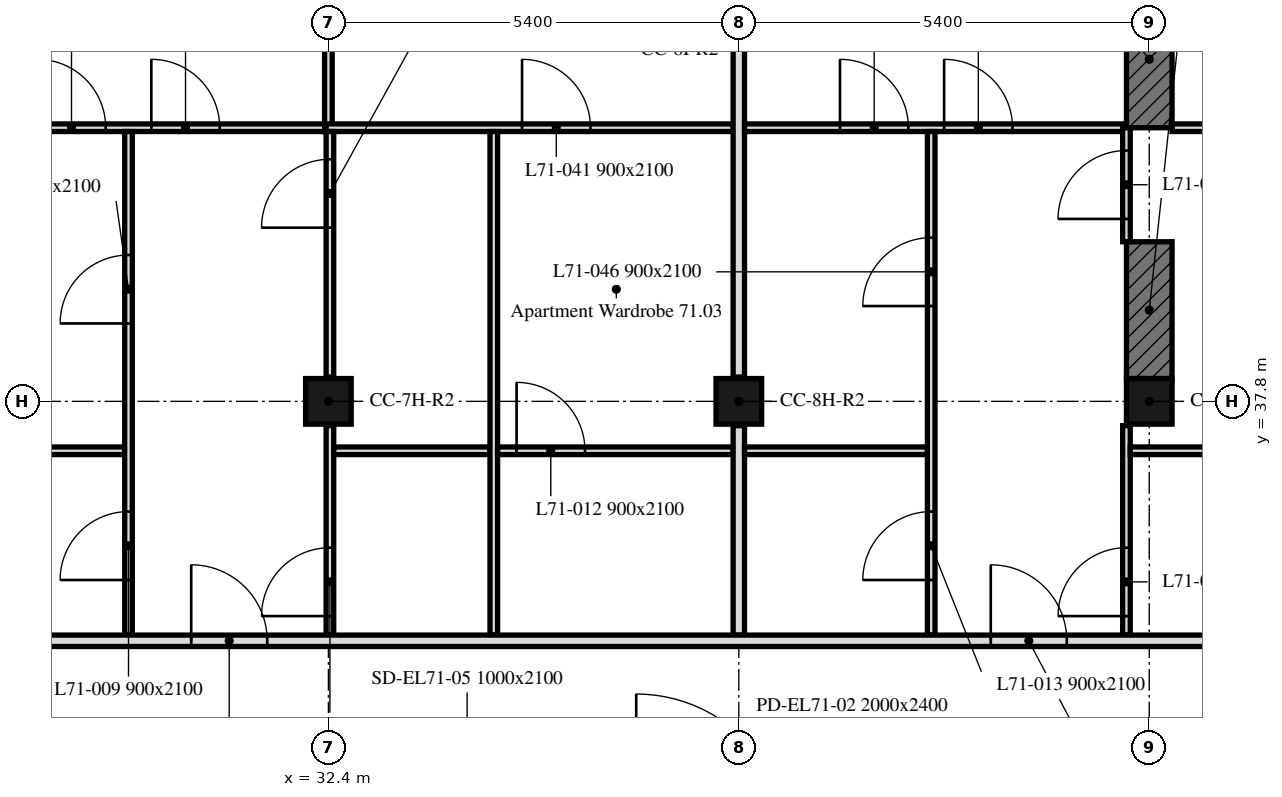
"""IFC4 building model, lengths in metres.
Left out: names, types, materials, properties, quantities, classifications, styles, units other than length and angle.
Written with IfcOpenShell. Run it as: python <this file> out.ifc"""

import sys

from ifc_helpers import new_model, si_unit, direction, frame, frame_2d, origin, origin_2d, place, context, subcontext, project, spatial, rectangle, extrude, element, fill, save


model = new_model("IFC4")
c1 = context("Model", 3, precision=1e-05, world=origin(), true_north=direction((0.0, 1.0)))
c2 = subcontext(c1, "Body", "Model", "MODEL_VIEW")
j1 = project(units=[si_unit("LENGTHUNIT", "METRE"), si_unit("PLANEANGLEUNIT", "RADIAN")], contexts=[c1])
p1 = place(None, origin())
s1 = spatial("IfcSite", under=j1, at=p1, CompositionType="ELEMENT")
p2 = place(p1, origin())
s2 = spatial("IfcBuilding", under=s1, at=p2, CompositionType="ELEMENT")
p3 = place(p2, frame((0.0, 0.0, 288.4)))
s3 = spatial("IfcBuildingStorey", under=s2, at=p3, CompositionType="ELEMENT", Elevation=288.4)
for number, where, z_axis, x_axis in (
    (1, (32.4, 37.8, 0.0), (0.0, 0.0, 1.0), (1.0, 0.0, 0.0)),
    (2, (37.8, 37.8, 0.0), (0.0, 0.0, 1.0), (1.0, 0.0, 0.0)),
    (3, (43.2, 37.8, 0.0), (0.0, 0.0, 1.0), (1.0, 0.0, 0.0)),
):
    element("IfcColumn", number, at=place(p3, frame(where, z_axis=z_axis, x_axis=x_axis)), inside=s3, PredefinedType="COLUMN", context=c2, shape_type="SweptSolid", body=[
        extrude(rectangle(XDim=0.6, YDim=0.6, at=origin_2d()), origin(), (0.0, 0.0, 1.0), 3.0),
    ])
p4 = place(p3, frame((43.2, 38.1, 0.0), z_axis=(0.0, 0.0, 1.0), x_axis=(0.0, 1.0, 0.0)))
e4 = element("IfcWall", 4, at=p4, inside=s3, PredefinedType="SHEAR", context=c2, shape_type="SweptSolid", body=[
    extrude(rectangle(XDim=1.8, YDim=0.6, at=frame_2d((0.9, 0.0))), origin(), (0.0, 0.0, 1.0), 3.0),
])
p5 = place(p3, frame((43.2, 41.4, 0.0), z_axis=(0.0, 0.0, 1.0), x_axis=(0.0, 1.0, 0.0)))
e5 = element("IfcWall", 5, at=p5, inside=s3, PredefinedType="SHEAR", context=c2, shape_type="SweptSolid", body=[
    extrude(rectangle(XDim=1.8, YDim=0.6, at=frame_2d((0.9, 0.0))), origin(), (0.0, 0.0, 1.0), 3.0),
])
p6 = place(p3, frame((32.4, 41.35, 0.0), z_axis=(0.0, 0.0, 1.0), x_axis=(0.0, 1.0, 0.0)))
e6 = element("IfcWall", 6, at=p6, inside=s3, PredefinedType="PARTITIONING", context=c2, shape_type="SweptSolid", body=[
    extrude(rectangle(XDim=1.53, YDim=0.1, at=frame_2d((0.765, 0.0))), origin(), (0.0, 0.0, 1.0), 2.4),
])
p7 = place(p3, frame((27.075, 41.4, 0.0), z_axis=(0.0, 0.0, 1.0), x_axis=(1.0, 0.0, 0.0)))
e7 = element("IfcWall", 7, at=p7, inside=s3, PredefinedType="PARTITIONING", context=c2, shape_type="SweptSolid", body=[
    extrude(rectangle(XDim=5.275, YDim=0.1, at=frame_2d((2.638, 0.0))), origin(), (0.0, 0.0, 1.0), 3.0),
])
p8 = place(p7, frame((1.495, 0.0, 0.0)))
e8 = element("IfcOpeningElement", 8, at=p8, cuts=e7, PredefinedType="OPENING", context=c2, shape_type="SweptSolid", body=[
    extrude(rectangle(XDim=0.9, YDim=2.1, at=frame_2d((0.45, 1.05))), frame((0.0, 0.05, 0.0), z_axis=(0.0, -1.0, 0.0), x_axis=(1.0, 0.0, 0.0)), (0.0, 0.0, 1.0), 0.1),
])
p9 = place(p7, frame((2.995, 0.0, 0.0)))
e9 = element("IfcOpeningElement", 9, at=p9, cuts=e7, PredefinedType="OPENING", context=c2, shape_type="SweptSolid", body=[
    extrude(rectangle(XDim=0.9, YDim=2.1, at=frame_2d((0.45, 1.05))), frame((0.0, 0.05, 0.0), z_axis=(0.0, -1.0, 0.0), x_axis=(1.0, 0.0, 0.0)), (0.0, 0.0, 1.0), 0.1),
])
p10 = place(p3, frame((32.37, 41.4, 0.0), z_axis=(0.0, 0.0, 1.0), x_axis=(1.0, 0.0, 0.0)))
e10 = element("IfcWall", 10, at=p10, inside=s3, PredefinedType="PARTITIONING", context=c2, shape_type="SweptSolid", body=[
    extrude(rectangle(XDim=5.355, YDim=0.1, at=frame_2d((2.677, 0.0))), origin(), (0.0, 0.0, 1.0), 3.0),
])
p11 = place(p10, frame((2.578, 0.0, 0.0)))
e11 = element("IfcOpeningElement", 11, at=p11, cuts=e10, PredefinedType="OPENING", context=c2, shape_type="SweptSolid", body=[
    extrude(rectangle(XDim=0.9, YDim=2.1, at=frame_2d((0.45, 1.05))), frame((0.0, 0.05, 0.0), z_axis=(0.0, -1.0, 0.0), x_axis=(1.0, 0.0, 0.0)), (0.0, 0.0, 1.0), 0.1),
])
p12 = place(p3, frame((27.075, 37.15, 0.0), z_axis=(0.0, 0.0, 1.0), x_axis=(1.0, 0.0, 0.0)))
e12 = element("IfcWall", 12, at=p12, inside=s3, PredefinedType="PARTITIONING", context=c2, shape_type="SweptSolid", body=[
    extrude(rectangle(XDim=2.645, YDim=0.1, at=frame_2d((1.323, 0.0))), origin(), (0.0, 0.0, 1.0), 3.0),
])
p13 = place(p3, frame((29.77, 34.725, 0.0), z_axis=(0.0, 0.0, 1.0), x_axis=(0.0, 1.0, 0.0)))
e13 = element("IfcWall", 13, at=p13, inside=s3, PredefinedType="PARTITIONING", context=c2, shape_type="SweptSolid", body=[
    extrude(rectangle(XDim=6.625, YDim=0.1, at=frame_2d((3.312, 0.0))), origin(), (0.0, 0.0, 1.0), 3.0),
])
p14 = place(p13, frame((0.725, 0.0, 0.0)))
e14 = element("IfcOpeningElement", 14, at=p14, cuts=e13, PredefinedType="OPENING", context=c2, shape_type="SweptSolid", body=[
    extrude(rectangle(XDim=0.9, YDim=2.1, at=frame_2d((0.45, 1.05))), frame((0.0, 0.05, 0.0), z_axis=(0.0, -1.0, 0.0), x_axis=(1.0, 0.0, 0.0)), (0.0, 0.0, 1.0), 0.1),
])
p15 = place(p13, frame((4.1, 0.0, 0.0)))
e15 = element("IfcOpeningElement", 15, at=p15, cuts=e13, PredefinedType="OPENING", context=c2, shape_type="SweptSolid", body=[
    extrude(rectangle(XDim=0.9, YDim=2.1, at=frame_2d((0.45, 1.05))), frame((0.0, 0.05, 0.0), z_axis=(0.0, -1.0, 0.0), x_axis=(1.0, 0.0, 0.0)), (0.0, 0.0, 1.0), 0.1),
])
p16 = place(p3, frame((32.42, 34.725, 0.0), z_axis=(0.0, 0.0, 1.0), x_axis=(0.0, 1.0, 0.0)))
e16 = element("IfcWall", 16, at=p16, inside=s3, PredefinedType="PARTITIONING", context=c2, shape_type="SweptSolid", body=[
    extrude(rectangle(XDim=2.755, YDim=0.1, at=frame_2d((1.377, 0.0))), origin(), (0.0, 0.0, 1.0), 2.4),
])
p17 = place(p16, frame((0.25, 0.0, 0.0)))
e17 = element("IfcOpeningElement", 17, at=p17, cuts=e16, PredefinedType="OPENING", context=c2, shape_type="SweptSolid", body=[
    extrude(rectangle(XDim=0.9, YDim=2.1, at=frame_2d((0.45, 1.05))), frame((0.0, 0.05, 0.0), z_axis=(0.0, -1.0, 0.0), x_axis=(1.0, 0.0, 0.0)), (0.0, 0.0, 1.0), 0.1),
])
p18 = place(p3, frame((32.42, 38.12, 0.0), z_axis=(0.0, 0.0, 1.0), x_axis=(0.0, 1.0, 0.0)))
e18 = element("IfcWall", 18, at=p18, inside=s3, PredefinedType="PARTITIONING", context=c2, shape_type="SweptSolid", body=[
    extrude(rectangle(XDim=3.23, YDim=0.1, at=frame_2d((1.615, 0.0))), origin(), (0.0, 0.0, 1.0), 2.4),
])
p19 = place(p18, frame((1.965, 0.0, 0.0)))
e19 = element("IfcOpeningElement", 19, at=p19, cuts=e18, PredefinedType="OPENING", context=c2, shape_type="SweptSolid", body=[
    extrude(rectangle(XDim=0.9, YDim=2.1, at=frame_2d((0.45, 1.05))), frame((0.0, 0.05, 0.0), z_axis=(0.0, -1.0, 0.0), x_axis=(1.0, 0.0, 0.0)), (0.0, 0.0, 1.0), 0.1),
])
p20 = place(p3, frame((32.47, 37.15, 0.0), z_axis=(0.0, 0.0, 1.0), x_axis=(1.0, 0.0, 0.0)))
e20 = element("IfcWall", 20, at=p20, inside=s3, PredefinedType="PARTITIONING", context=c2, shape_type="SweptSolid", body=[
    extrude(rectangle(XDim=2.056, YDim=0.1, at=frame_2d((1.028, 0.0))), origin(), (0.0, 0.0, 1.0), 3.0),
])
p21 = place(p3, frame((34.576, 34.725, 0.0), z_axis=(0.0, 0.0, 1.0), x_axis=(0.0, 1.0, 0.0)))
e21 = element("IfcWall", 21, at=p21, inside=s3, PredefinedType="PARTITIONING", context=c2, shape_type="SweptSolid", body=[
    extrude(rectangle(XDim=6.625, YDim=0.1, at=frame_2d((3.312, 0.0))), origin(), (0.0, 0.0, 1.0), 2.4),
])
p22 = place(p3, frame((37.8, 38.12, 0.0), z_axis=(0.0, 0.0, 1.0), x_axis=(0.0, 1.0, 0.0)))
e22 = element("IfcWall", 22, at=p22, inside=s3, PredefinedType="PARTITIONING", context=c2, shape_type="SweptSolid", body=[
    extrude(rectangle(XDim=4.76, YDim=0.15, at=frame_2d((2.38, 0.0))), origin(), (0.0, 0.0, 1.0), 2.4),
])
p23 = place(p3, frame((34.626, 37.15, 0.0), z_axis=(0.0, 0.0, 1.0), x_axis=(1.0, 0.0, 0.0)))
e23 = element("IfcWall", 23, at=p23, inside=s3, PredefinedType="PARTITIONING", context=c2, shape_type="SweptSolid", body=[
    extrude(rectangle(XDim=3.099, YDim=0.1, at=frame_2d((1.55, 0.0))), origin(), (0.0, 0.0, 1.0), 3.0),
])
p24 = place(p23, frame((0.25, 0.0, 0.0)))
e24 = element("IfcOpeningElement", 24, at=p24, cuts=e23, PredefinedType="OPENING", context=c2, shape_type="SweptSolid", body=[
    extrude(rectangle(XDim=0.9, YDim=2.1, at=frame_2d((0.45, 1.05))), frame((0.0, 0.05, 0.0), z_axis=(0.0, -1.0, 0.0), x_axis=(1.0, 0.0, 0.0)), (0.0, 0.0, 1.0), 0.1),
])
p25 = place(p3, frame((37.8, 34.725, 0.0), z_axis=(0.0, 0.0, 1.0), x_axis=(0.0, 1.0, 0.0)))
e25 = element("IfcWall", 25, at=p25, inside=s3, PredefinedType="PARTITIONING", context=c2, shape_type="SweptSolid", body=[
    extrude(rectangle(XDim=2.755, YDim=0.15, at=frame_2d((1.377, 0.0))), origin(), (0.0, 0.0, 1.0), 2.4),
])
p26 = place(p3, frame((37.875, 41.4, 0.0), z_axis=(0.0, 0.0, 1.0), x_axis=(1.0, 0.0, 0.0)))
e26 = element("IfcWall", 26, at=p26, inside=s3, PredefinedType="PARTITIONING", context=c2, shape_type="SweptSolid", body=[
    extrude(rectangle(XDim=5.024, YDim=0.1, at=frame_2d((2.512, 0.0))), origin(), (0.0, 0.0, 1.0), 3.0),
])
p27 = place(p26, frame((1.256, 0.0, 0.0)))
e27 = element("IfcOpeningElement", 27, at=p27, cuts=e26, PredefinedType="OPENING", context=c2, shape_type="SweptSolid", body=[
    extrude(rectangle(XDim=0.9, YDim=2.1, at=frame_2d((0.45, 1.05))), frame((0.0, 0.05, 0.0), z_axis=(0.0, -1.0, 0.0), x_axis=(1.0, 0.0, 0.0)), (0.0, 0.0, 1.0), 0.1),
])
p28 = place(p26, frame((2.626, 0.0, 0.0)))
e28 = element("IfcOpeningElement", 28, at=p28, cuts=e26, PredefinedType="OPENING", context=c2, shape_type="SweptSolid", body=[
    extrude(rectangle(XDim=0.9, YDim=2.1, at=frame_2d((0.45, 1.05))), frame((0.0, 0.05, 0.0), z_axis=(0.0, -1.0, 0.0), x_axis=(1.0, 0.0, 0.0)), (0.0, 0.0, 1.0), 0.1),
])
p29 = place(p3, frame((43.501, 41.4, 0.0), z_axis=(0.0, 0.0, 1.0), x_axis=(1.0, 0.0, 0.0)))
e29 = element("IfcWall", 29, at=p29, inside=s3, PredefinedType="PARTITIONING", context=c2, shape_type="SweptSolid", body=[
    extrude(rectangle(XDim=4.348, YDim=0.1, at=frame_2d((2.174, 0.0))), origin(), (0.0, 0.0, 1.0), 3.0),
])
p30 = place(p29, frame((2.369, 0.0, 0.0)))
e30 = element("IfcOpeningElement", 30, at=p30, cuts=e29, PredefinedType="OPENING", context=c2, shape_type="SweptSolid", body=[
    extrude(rectangle(XDim=0.9, YDim=2.1, at=frame_2d((0.45, 1.05))), frame((0.0, 0.05, 0.0), z_axis=(0.0, -1.0, 0.0), x_axis=(1.0, 0.0, 0.0)), (0.0, 0.0, 1.0), 0.1),
])
p31 = place(p3, frame((37.875, 37.15, 0.0), z_axis=(0.0, 0.0, 1.0), x_axis=(1.0, 0.0, 0.0)))
e31 = element("IfcWall", 31, at=p31, inside=s3, PredefinedType="PARTITIONING", context=c2, shape_type="SweptSolid", body=[
    extrude(rectangle(XDim=2.406, YDim=0.1, at=frame_2d((1.203, 0.0))), origin(), (0.0, 0.0, 1.0), 3.0),
])
p32 = place(p3, frame((40.331, 34.725, 0.0), z_axis=(0.0, 0.0, 1.0), x_axis=(0.0, 1.0, 0.0)))
e32 = element("IfcWall", 32, at=p32, inside=s3, PredefinedType="PARTITIONING", context=c2, shape_type="SweptSolid", body=[
    extrude(rectangle(XDim=6.625, YDim=0.1, at=frame_2d((3.312, 0.0))), origin(), (0.0, 0.0, 1.0), 2.4),
])
p33 = place(p32, frame((0.725, 0.0, 0.0)))
e33 = element("IfcOpeningElement", 33, at=p33, cuts=e32, PredefinedType="OPENING", context=c2, shape_type="SweptSolid", body=[
    extrude(rectangle(XDim=0.9, YDim=2.1, at=frame_2d((0.45, 1.05))), frame((0.0, 0.05, 0.0), z_axis=(0.0, -1.0, 0.0), x_axis=(1.0, 0.0, 0.0)), (0.0, 0.0, 1.0), 0.1),
])
p34 = place(p32, frame((4.329, 0.0, 0.0)))
e34 = element("IfcOpeningElement", 34, at=p34, cuts=e32, PredefinedType="OPENING", context=c2, shape_type="SweptSolid", body=[
    extrude(rectangle(XDim=0.9, YDim=2.1, at=frame_2d((0.45, 1.05))), frame((0.0, 0.05, 0.0), z_axis=(0.0, -1.0, 0.0), x_axis=(1.0, 0.0, 0.0)), (0.0, 0.0, 1.0), 0.1),
])
p35 = place(p3, frame((42.9, 34.725, 0.0), z_axis=(0.0, 0.0, 1.0), x_axis=(0.0, 1.0, 0.0)))
e35 = element("IfcWall", 35, at=p35, inside=s3, PredefinedType="PARTITIONING", context=c2, shape_type="SweptSolid", body=[
    extrude(rectangle(XDim=2.755, YDim=0.1, at=frame_2d((1.377, 0.0))), origin(), (0.0, 0.0, 1.0), 3.0),
])
p36 = place(p35, frame((0.25, 0.0, 0.0)))
e36 = element("IfcOpeningElement", 36, at=p36, cuts=e35, PredefinedType="OPENING", context=c2, shape_type="SweptSolid", body=[
    extrude(rectangle(XDim=0.9, YDim=2.1, at=frame_2d((0.45, 1.05))), frame((0.0, 0.05, 0.0), z_axis=(0.0, -1.0, 0.0), x_axis=(1.0, 0.0, 0.0)), (0.0, 0.0, 1.0), 0.1),
])
p37 = place(p3, frame((42.9, 39.9, 0.0), z_axis=(0.0, 0.0, 1.0), x_axis=(0.0, 1.0, 0.0)))
e37 = element("IfcWall", 37, at=p37, inside=s3, PredefinedType="PARTITIONING", context=c2, shape_type="SweptSolid", body=[
    extrude(rectangle(XDim=1.5, YDim=0.1, at=frame_2d((0.75, 0.0))), origin(), (0.0, 0.0, 1.0), 3.0),
])
p38 = place(p37, frame((0.3, 0.0, 0.0)))
e38 = element("IfcOpeningElement", 38, at=p38, cuts=e37, PredefinedType="OPENING", context=c2, shape_type="SweptSolid", body=[
    extrude(rectangle(XDim=0.9, YDim=2.1, at=frame_2d((0.45, 1.05))), frame((0.0, 0.05, 0.0), z_axis=(0.0, -1.0, 0.0), x_axis=(1.0, 0.0, 0.0)), (0.0, 0.0, 1.0), 0.1),
])
p39 = place(p3, frame((42.95, 37.15, 0.0), z_axis=(0.0, 0.0, 1.0), x_axis=(1.0, 0.0, 0.0)))
e39 = element("IfcWall", 39, at=p39, inside=s3, PredefinedType="PARTITIONING", context=c2, shape_type="SweptSolid", body=[
    extrude(rectangle(XDim=2.7, YDim=0.1, at=frame_2d((1.35, 0.0))), origin(), (0.0, 0.0, 1.0), 3.0),
])
p40 = place(p3, frame((6.151, 34.65, 0.0), z_axis=(0.0, 0.0, 1.0), x_axis=(1.0, 0.0, 0.0)))
e40 = element("IfcWall", 40, at=p40, inside=s3, PredefinedType="PARTITIONING", context=c2, shape_type="SweptSolid", body=[
    extrude(rectangle(XDim=41.698, YDim=0.15, at=frame_2d((20.849, 0.0))), origin(), (0.0, 0.0, 1.0), 2.4),
])
p41 = place(p40, frame((2.969, 0.0, 0.0)))
e41 = element("IfcOpeningElement", 41, at=p41, cuts=e40, PredefinedType="OPENING", context=c2, shape_type="SweptSolid", body=[
    extrude(rectangle(XDim=1.0, YDim=2.1, at=frame_2d((0.5, 1.05))), frame((0.0, 0.075, 0.0), z_axis=(0.0, -1.0, 0.0), x_axis=(1.0, 0.0, 0.0)), (0.0, 0.0, 1.0), 0.15),
])
p42 = place(p40, frame((12.944, 0.0, 0.0)))
e42 = element("IfcOpeningElement", 42, at=p42, cuts=e40, PredefinedType="OPENING", context=c2, shape_type="SweptSolid", body=[
    extrude(rectangle(XDim=1.0, YDim=2.1, at=frame_2d((0.5, 1.05))), frame((0.0, 0.075, 0.0), z_axis=(0.0, -1.0, 0.0), x_axis=(1.0, 0.0, 0.0)), (0.0, 0.0, 1.0), 0.15),
])
p43 = place(p40, frame((24.444, 0.0, 0.0)))
e43 = element("IfcOpeningElement", 43, at=p43, cuts=e40, PredefinedType="OPENING", context=c2, shape_type="SweptSolid", body=[
    extrude(rectangle(XDim=1.0, YDim=2.1, at=frame_2d((0.5, 1.05))), frame((0.0, 0.075, 0.0), z_axis=(0.0, -1.0, 0.0), x_axis=(1.0, 0.0, 0.0)), (0.0, 0.0, 1.0), 0.15),
])
p44 = place(p40, frame((34.964, 0.0, 0.0)))
e44 = element("IfcOpeningElement", 44, at=p44, cuts=e40, PredefinedType="OPENING", context=c2, shape_type="SweptSolid", body=[
    extrude(rectangle(XDim=1.0, YDim=2.1, at=frame_2d((0.5, 1.05))), frame((0.0, 0.075, 0.0), z_axis=(0.0, -1.0, 0.0), x_axis=(1.0, 0.0, 0.0)), (0.0, 0.0, 1.0), 0.15),
])
p45 = place(p14, origin())
e45 = element("IfcDoor", 45, at=p45, inside=s3, OperationType="SINGLE_SWING_LEFT", PredefinedType="DOOR", context=c2, shape_type="SweptSolid", body=[
    extrude(rectangle(XDim=0.9, YDim=2.1, at=frame_2d((0.45, 1.05))), frame((0.0, 0.025, 0.0), z_axis=(0.0, -1.0, 0.0), x_axis=(1.0, 0.0, 0.0)), (0.0, 0.0, 1.0), 0.05),
])
fill(e14, e45)
p46 = place(p19, origin())
e46 = element("IfcDoor", 46, at=p46, inside=s3, OperationType="SINGLE_SWING_RIGHT", PredefinedType="DOOR", context=c2, shape_type="SweptSolid", body=[
    extrude(rectangle(XDim=0.9, YDim=2.1, at=frame_2d((0.45, 1.05))), frame((0.0, 0.025, 0.0), z_axis=(0.0, -1.0, 0.0), x_axis=(1.0, 0.0, 0.0)), (0.0, 0.0, 1.0), 0.05),
])
fill(e19, e46)
p47 = place(p17, origin())
e47 = element("IfcDoor", 47, at=p47, inside=s3, OperationType="SINGLE_SWING_RIGHT", PredefinedType="DOOR", context=c2, shape_type="SweptSolid", body=[
    extrude(rectangle(XDim=0.9, YDim=2.1, at=frame_2d((0.45, 1.05))), frame((0.0, 0.025, 0.0), z_axis=(0.0, -1.0, 0.0), x_axis=(1.0, 0.0, 0.0)), (0.0, 0.0, 1.0), 0.05),
])
fill(e17, e47)
p48 = place(p24, origin())
e48 = element("IfcDoor", 48, at=p48, inside=s3, OperationType="SINGLE_SWING_RIGHT", PredefinedType="DOOR", context=c2, shape_type="SweptSolid", body=[
    extrude(rectangle(XDim=0.9, YDim=2.1, at=frame_2d((0.45, 1.05))), frame((0.0, 0.025, 0.0), z_axis=(0.0, -1.0, 0.0), x_axis=(1.0, 0.0, 0.0)), (0.0, 0.0, 1.0), 0.05),
])
fill(e24, e48)
p49 = place(p33, origin())
e49 = element("IfcDoor", 49, at=p49, inside=s3, OperationType="SINGLE_SWING_RIGHT", PredefinedType="DOOR", context=c2, shape_type="SweptSolid", body=[
    extrude(rectangle(XDim=0.9, YDim=2.1, at=frame_2d((0.45, 1.05))), frame((0.0, 0.025, 0.0), z_axis=(0.0, -1.0, 0.0), x_axis=(1.0, 0.0, 0.0)), (0.0, 0.0, 1.0), 0.05),
])
fill(e33, e49)
p50 = place(p38, origin())
e50 = element("IfcDoor", 50, at=p50, inside=s3, OperationType="SINGLE_SWING_LEFT", PredefinedType="DOOR", context=c2, shape_type="SweptSolid", body=[
    extrude(rectangle(XDim=0.9, YDim=2.1, at=frame_2d((0.45, 1.05))), frame((0.0, 0.025, 0.0), z_axis=(0.0, -1.0, 0.0), x_axis=(1.0, 0.0, 0.0)), (0.0, 0.0, 1.0), 0.05),
])
fill(e38, e50)
p51 = place(p36, origin())
e51 = element("IfcDoor", 51, at=p51, inside=s3, OperationType="SINGLE_SWING_LEFT", PredefinedType="DOOR", context=c2, shape_type="SweptSolid", body=[
    extrude(rectangle(XDim=0.9, YDim=2.1, at=frame_2d((0.45, 1.05))), frame((0.0, 0.025, 0.0), z_axis=(0.0, -1.0, 0.0), x_axis=(1.0, 0.0, 0.0)), (0.0, 0.0, 1.0), 0.05),
])
fill(e36, e51)
p52 = place(p8, origin())
e52 = element("IfcDoor", 52, at=p52, inside=s3, OperationType="SINGLE_SWING_RIGHT", PredefinedType="DOOR", context=c2, shape_type="SweptSolid", body=[
    extrude(rectangle(XDim=0.9, YDim=2.1, at=frame_2d((0.45, 1.05))), frame((0.0, 0.025, 0.0), z_axis=(0.0, -1.0, 0.0), x_axis=(1.0, 0.0, 0.0)), (0.0, 0.0, 1.0), 0.05),
])
fill(e8, e52)
p53 = place(p11, origin())
e53 = element("IfcDoor", 53, at=p53, inside=s3, OperationType="SINGLE_SWING_LEFT", PredefinedType="DOOR", context=c2, shape_type="SweptSolid", body=[
    extrude(rectangle(XDim=0.9, YDim=2.1, at=frame_2d((0.45, 1.05))), frame((0.0, 0.025, 0.0), z_axis=(0.0, -1.0, 0.0), x_axis=(1.0, 0.0, 0.0)), (0.0, 0.0, 1.0), 0.05),
])
fill(e11, e53)
p54 = place(p15, origin())
e54 = element("IfcDoor", 54, at=p54, inside=s3, OperationType="SINGLE_SWING_RIGHT", PredefinedType="DOOR", context=c2, shape_type="SweptSolid", body=[
    extrude(rectangle(XDim=0.9, YDim=2.1, at=frame_2d((0.45, 1.05))), frame((0.0, 0.025, 0.0), z_axis=(0.0, -1.0, 0.0), x_axis=(1.0, 0.0, 0.0)), (0.0, 0.0, 1.0), 0.05),
])
fill(e15, e54)
p55 = place(p27, origin())
e55 = element("IfcDoor", 55, at=p55, inside=s3, OperationType="SINGLE_SWING_LEFT", PredefinedType="DOOR", context=c2, shape_type="SweptSolid", body=[
    extrude(rectangle(XDim=0.9, YDim=2.1, at=frame_2d((0.45, 1.05))), frame((0.0, 0.025, 0.0), z_axis=(0.0, -1.0, 0.0), x_axis=(1.0, 0.0, 0.0)), (0.0, 0.0, 1.0), 0.05),
])
fill(e27, e55)
p56 = place(p34, origin())
e56 = element("IfcDoor", 56, at=p56, inside=s3, OperationType="SINGLE_SWING_LEFT", PredefinedType="DOOR", context=c2, shape_type="SweptSolid", body=[
    extrude(rectangle(XDim=0.9, YDim=2.1, at=frame_2d((0.45, 1.05))), frame((0.0, 0.025, 0.0), z_axis=(0.0, -1.0, 0.0), x_axis=(1.0, 0.0, 0.0)), (0.0, 0.0, 1.0), 0.05),
])
fill(e34, e56)
p57 = place(p9, origin())
e57 = element("IfcDoor", 57, at=p57, inside=s3, OperationType="SINGLE_SWING_LEFT", PredefinedType="DOOR", context=c2, shape_type="SweptSolid", body=[
    extrude(rectangle(XDim=0.9, YDim=2.1, at=frame_2d((0.45, 1.05))), frame((0.0, 0.025, 0.0), z_axis=(0.0, -1.0, 0.0), x_axis=(1.0, 0.0, 0.0)), (0.0, 0.0, 1.0), 0.05),
])
fill(e9, e57)
p58 = place(p28, origin())
e58 = element("IfcDoor", 58, at=p58, inside=s3, OperationType="SINGLE_SWING_RIGHT", PredefinedType="DOOR", context=c2, shape_type="SweptSolid", body=[
    extrude(rectangle(XDim=0.9, YDim=2.1, at=frame_2d((0.45, 1.05))), frame((0.0, 0.025, 0.0), z_axis=(0.0, -1.0, 0.0), x_axis=(1.0, 0.0, 0.0)), (0.0, 0.0, 1.0), 0.05),
])
fill(e28, e58)
p59 = place(p43, origin())
e59 = element("IfcDoor", 59, at=p59, inside=s3, OperationType="SINGLE_SWING_LEFT", PredefinedType="DOOR", context=c2, shape_type="SweptSolid", body=[
    extrude(rectangle(XDim=1.0, YDim=2.1, at=frame_2d((0.5, 1.05))), frame((0.0, 0.025, 0.0), z_axis=(0.0, -1.0, 0.0), x_axis=(1.0, 0.0, 0.0)), (0.0, 0.0, 1.0), 0.05),
])
fill(e43, e59)
p60 = place(p44, origin())
e60 = element("IfcDoor", 60, at=p60, inside=s3, OperationType="SINGLE_SWING_LEFT", PredefinedType="DOOR", context=c2, shape_type="SweptSolid", body=[
    extrude(rectangle(XDim=1.0, YDim=2.1, at=frame_2d((0.5, 1.05))), frame((0.0, 0.025, 0.0), z_axis=(0.0, -1.0, 0.0), x_axis=(1.0, 0.0, 0.0)), (0.0, 0.0, 1.0), 0.05),
])
fill(e44, e60)
save(model, sys.argv[1])
